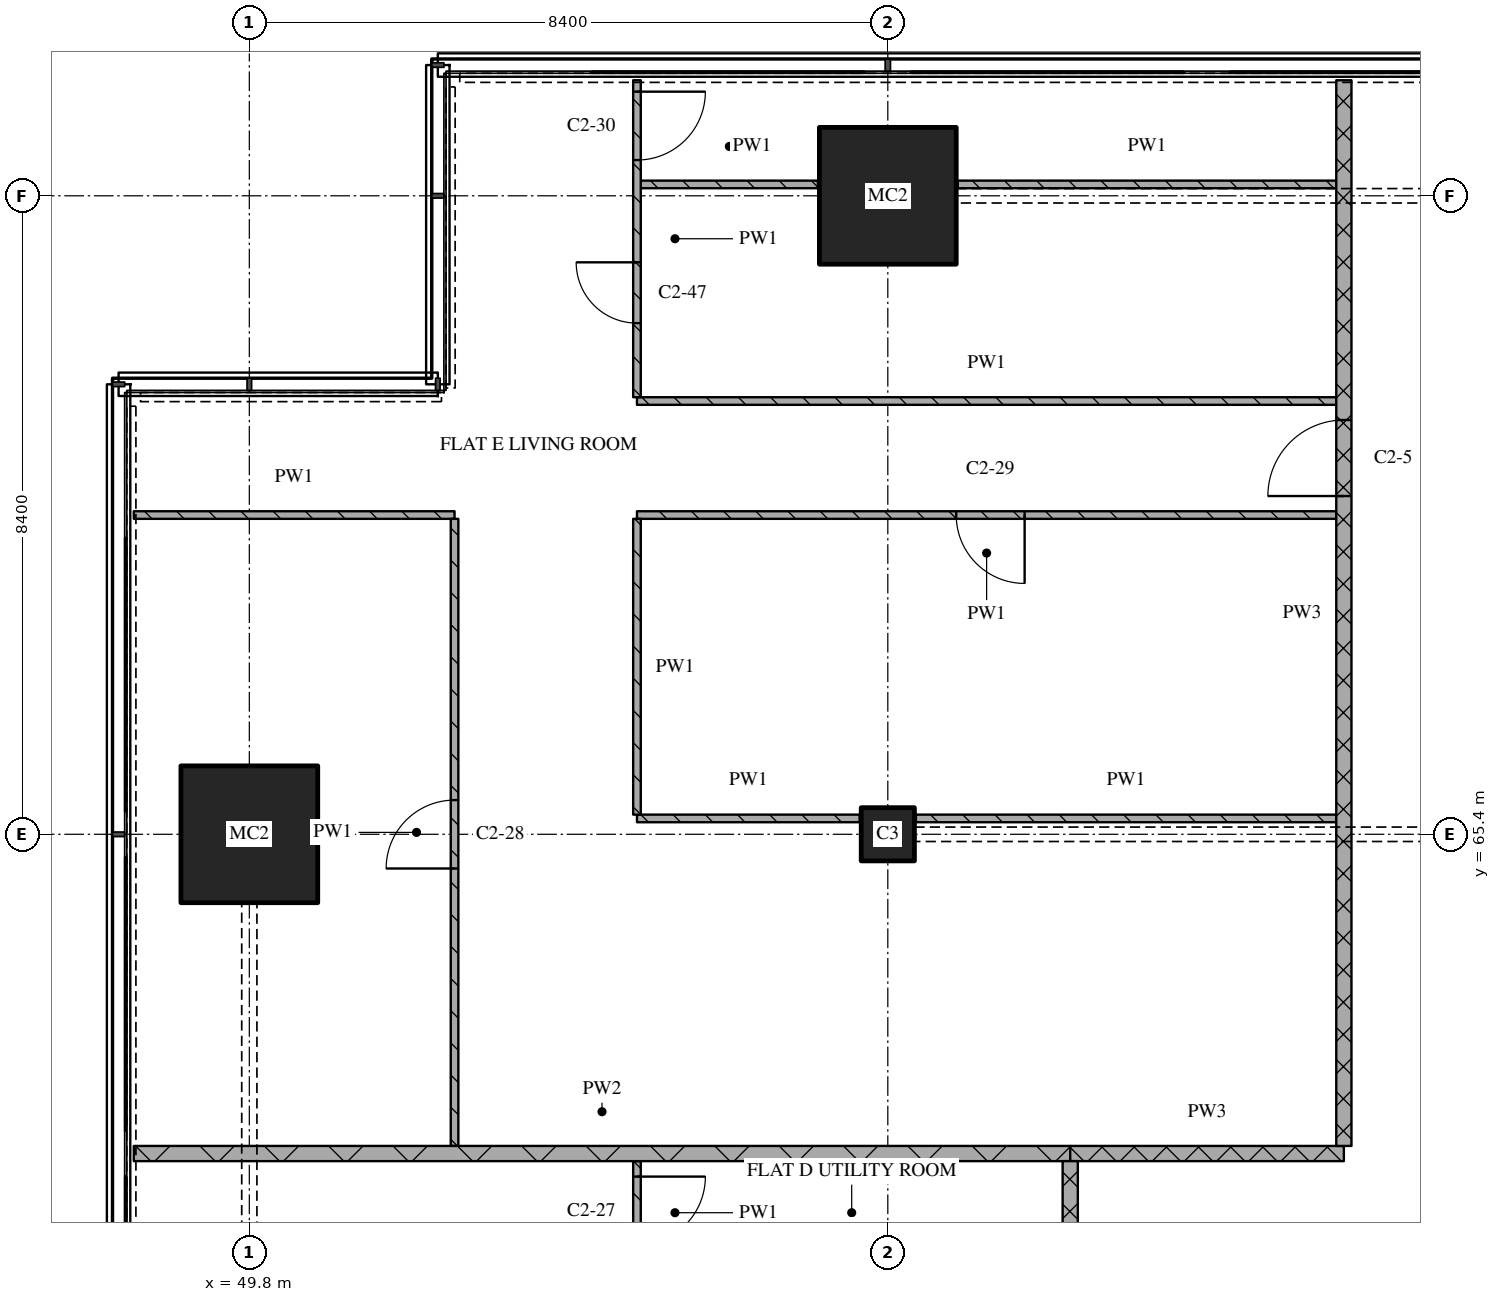
"""IFC4 building model, lengths in metres.
Left out: names, types, materials, properties, quantities, classifications, styles, units other than length and angle.
Written with IfcOpenShell. Run it as: python <this file> out.ifc"""

import sys

from ifc_helpers import new_model, si_unit, direction, frame, frame_2d, origin, origin_2d, place, context, subcontext, project, spatial, rectangle, extrude, element, fill, save


model = new_model("IFC4")
c1 = context("Model", 3, precision=1e-05, world=origin(), true_north=direction((0.0, 1.0)))
c2 = subcontext(c1, "Body", "Model", "MODEL_VIEW")
j1 = project(units=[si_unit("LENGTHUNIT", "METRE"), si_unit("PLANEANGLEUNIT", "RADIAN")], contexts=[c1])
p1 = place(None, origin())
s1 = spatial("IfcSite", under=j1, at=p1, CompositionType="ELEMENT")
p2 = place(p1, origin())
s2 = spatial("IfcBuilding", under=s1, at=p2, CompositionType="ELEMENT")
p3 = place(p2, frame((0.0, 0.0, 161.85)))
s3 = spatial("IfcBuildingStorey", under=s2, at=p3, CompositionType="ELEMENT", Elevation=161.85)
p4 = place(p3, frame((49.8, 65.4, 0.0), z_axis=(0.0, 0.0, 1.0), x_axis=(1.0, 0.0, 0.0)))
e1 = element("IfcColumn", 1, at=p4, inside=s3, PredefinedType="COLUMN", context=c2, shape_type="SweptSolid", body=[
    extrude(rectangle(XDim=1.8, YDim=1.8, at=origin_2d()), origin(), (0.0, 0.0, 1.0), 3.6),
])
p5 = place(p3, frame((58.2, 65.4, 0.0), z_axis=(0.0, 0.0, 1.0), x_axis=(1.0, 0.0, 0.0)))
e2 = element("IfcColumn", 2, at=p5, inside=s3, PredefinedType="COLUMN", context=c2, shape_type="SweptSolid", body=[
    extrude(rectangle(XDim=0.7, YDim=0.7, at=origin_2d()), origin(), (0.0, 0.0, 1.0), 3.6),
])
p6 = place(p3, frame((58.2, 73.8, 0.0), z_axis=(0.0, 0.0, 1.0), x_axis=(1.0, 0.0, 0.0)))
e3 = element("IfcColumn", 3, at=p6, inside=s3, PredefinedType="COLUMN", context=c2, shape_type="SweptSolid", body=[
    extrude(rectangle(XDim=1.8, YDim=1.8, at=origin_2d()), origin(), (0.0, 0.0, 1.0), 3.6),
])
p7 = place(p3, frame((60.6, 61.2, 0.0), z_axis=(0.0, 0.0, 1.0), x_axis=(1.0, 0.0, 0.0)))
e4 = element("IfcWall", 4, at=p7, inside=s3, PredefinedType="PARTITIONING", context=c2, shape_type="SweptSolid", body=[
    extrude(rectangle(XDim=3.6, YDim=0.2, at=frame_2d((1.8, 0.0))), origin(), (0.0, 0.0, 1.0), 3.32),
])
p8 = place(p3, frame((48.28, 61.2, 0.0), z_axis=(0.0, 0.0, 1.0), x_axis=(1.0, 0.0, 0.0)))
e5 = element("IfcWall", 5, at=p8, inside=s3, PredefinedType="PARTITIONING", context=c2, shape_type="SweptSolid", body=[
    extrude(rectangle(XDim=12.32, YDim=0.2, at=frame_2d((6.16, 0.0))), origin(), (0.0, 0.0, 1.0), 3.32),
])
p9 = place(p3, frame((54.9, 65.609, 0.0), z_axis=(0.0, 0.0, 1.0), x_axis=(1.0, 0.0, 0.0)))
e6 = element("IfcWall", 6, at=p9, inside=s3, PredefinedType="PARTITIONING", context=c2, shape_type="SweptSolid", body=[
    extrude(rectangle(XDim=2.93, YDim=0.1, at=frame_2d((1.465, 0.0))), origin(), (0.0, 0.0, 1.0), 3.32),
])
p10 = place(p3, frame((58.57, 65.609, 0.0), z_axis=(0.0, 0.0, 1.0), x_axis=(1.0, 0.0, 0.0)))
e7 = element("IfcWall", 7, at=p10, inside=s3, PredefinedType="PARTITIONING", context=c2, shape_type="SweptSolid", body=[
    extrude(rectangle(XDim=5.53, YDim=0.1, at=frame_2d((2.765, 0.0))), origin(), (0.0, 0.0, 1.0), 3.32),
])
p11 = place(p3, frame((48.28, 69.6, 0.0), z_axis=(0.0, 0.0, 1.0), x_axis=(1.0, 0.0, 0.0)))
e8 = element("IfcWall", 8, at=p11, inside=s3, PredefinedType="PARTITIONING", context=c2, shape_type="SweptSolid", body=[
    extrude(rectangle(XDim=4.22, YDim=0.1, at=frame_2d((2.11, 0.0))), origin(), (0.0, 0.0, 1.0), 3.32),
])
p12 = place(p3, frame((64.1, 69.6, 0.0), z_axis=(0.0, 0.0, 1.0), x_axis=(-1.0, 0.0, 0.0)))
e9 = element("IfcWall", 9, at=p12, inside=s3, PredefinedType="PARTITIONING", context=c2, shape_type="SweptSolid", body=[
    extrude(rectangle(XDim=9.2, YDim=0.1, at=frame_2d((4.6, 0.0))), origin(), (0.0, 0.0, 1.0), 3.32),
])
p13 = place(p12, frame((4.1, 0.0, 0.0)))
e10 = element("IfcOpeningElement", 10, at=p13, cuts=e9, PredefinedType="OPENING", context=c2, shape_type="SweptSolid", body=[
    extrude(rectangle(XDim=0.9, YDim=2.1, at=frame_2d((0.45, 1.05))), frame((0.0, 0.06, 0.0), z_axis=(0.0, -1.0, 0.0), x_axis=(1.0, 0.0, 0.0)), (0.0, 0.0, 1.0), 0.12),
])
p14 = place(p3, frame((54.9, 71.1, 0.0), z_axis=(0.0, 0.0, 1.0), x_axis=(1.0, 0.0, 0.0)))
e11 = element("IfcWall", 11, at=p14, inside=s3, PredefinedType="PARTITIONING", context=c2, shape_type="SweptSolid", body=[
    extrude(rectangle(XDim=9.2, YDim=0.1, at=frame_2d((4.6, 0.0))), origin(), (0.0, 0.0, 1.0), 3.32),
])
p15 = place(p3, frame((54.95, 73.949, 0.0), z_axis=(0.0, 0.0, 1.0), x_axis=(1.0, 0.0, 0.0)))
e12 = element("IfcWall", 12, at=p15, inside=s3, PredefinedType="PARTITIONING", context=c2, shape_type="SweptSolid", body=[
    extrude(rectangle(XDim=2.33, YDim=0.1, at=frame_2d((1.165, 0.0))), origin(), (0.0, 0.0, 1.0), 3.32),
])
p16 = place(p3, frame((59.12, 73.949, 0.0), z_axis=(0.0, 0.0, 1.0), x_axis=(1.0, 0.0, 0.0)))
e13 = element("IfcWall", 13, at=p16, inside=s3, PredefinedType="PARTITIONING", context=c2, shape_type="SweptSolid", body=[
    extrude(rectangle(XDim=4.98, YDim=0.1, at=frame_2d((2.49, 0.0))), origin(), (0.0, 0.0, 1.0), 3.32),
])
p17 = place(p3, frame((52.5, 61.3, 0.0), z_axis=(0.0, 0.0, 1.0), x_axis=(0.0, 1.0, 0.0)))
e14 = element("IfcWall", 14, at=p17, inside=s3, PredefinedType="PARTITIONING", context=c2, shape_type="SweptSolid", body=[
    extrude(rectangle(XDim=8.25, YDim=0.1, at=frame_2d((4.125, 0.0))), origin(), (0.0, 0.0, 1.0), 3.32),
])
p18 = place(p17, frame((3.65, 0.0, 0.0)))
e15 = element("IfcOpeningElement", 15, at=p18, cuts=e14, PredefinedType="OPENING", context=c2, shape_type="SweptSolid", body=[
    extrude(rectangle(XDim=0.9, YDim=2.1, at=frame_2d((0.45, 1.05))), frame((0.0, 0.06, 0.0), z_axis=(0.0, -1.0, 0.0), x_axis=(1.0, 0.0, 0.0)), (0.0, 0.0, 1.0), 0.12),
])
p19 = place(p3, frame((54.9, 61.1, 0.0), z_axis=(0.0, 0.0, 1.0), x_axis=(0.0, -1.0, 0.0)))
e16 = element("IfcWall", 16, at=p19, inside=s3, PredefinedType="PARTITIONING", context=c2, shape_type="SweptSolid", body=[
    extrude(rectangle(XDim=1.357, YDim=0.1, at=frame_2d((0.679, 0.0))), origin(), (0.0, 0.0, 1.0), 3.32),
])
p20 = place(p19, frame((0.204, 0.0, 0.0)))
e17 = element("IfcOpeningElement", 17, at=p20, cuts=e16, PredefinedType="OPENING", context=c2, shape_type="SweptSolid", body=[
    extrude(rectangle(XDim=0.9, YDim=2.1, at=frame_2d((0.45, 1.05))), frame((0.0, 0.06, 0.0), z_axis=(0.0, -1.0, 0.0), x_axis=(1.0, 0.0, 0.0)), (0.0, 0.0, 1.0), 0.12),
])
p21 = place(p3, frame((54.9, 69.55, 0.0), z_axis=(0.0, 0.0, 1.0), x_axis=(0.0, -1.0, 0.0)))
e18 = element("IfcWall", 18, at=p21, inside=s3, PredefinedType="PARTITIONING", context=c2, shape_type="SweptSolid", body=[
    extrude(rectangle(XDim=3.891, YDim=0.1, at=frame_2d((1.946, 0.0))), origin(), (0.0, 0.0, 1.0), 3.32),
])
p22 = place(p3, frame((54.9, 75.32, 0.0), z_axis=(0.0, 0.0, 1.0), x_axis=(0.0, -1.0, 0.0)))
e19 = element("IfcWall", 19, at=p22, inside=s3, PredefinedType="PARTITIONING", context=c2, shape_type="SweptSolid", body=[
    extrude(rectangle(XDim=4.17, YDim=0.1, at=frame_2d((2.085, 0.0))), origin(), (0.0, 0.0, 1.0), 3.32),
])
p23 = place(p22, frame((0.15, 0.0, 0.0)))
e20 = element("IfcOpeningElement", 20, at=p23, cuts=e19, PredefinedType="OPENING", context=c2, shape_type="SweptSolid", body=[
    extrude(rectangle(XDim=0.9, YDim=2.1, at=frame_2d((0.45, 1.05))), frame((0.0, 0.06, 0.0), z_axis=(0.0, -1.0, 0.0), x_axis=(1.0, 0.0, 0.0)), (0.0, 0.0, 1.0), 0.12),
])
p24 = place(p22, frame((2.395, 0.0, 0.0)))
e21 = element("IfcOpeningElement", 21, at=p24, cuts=e19, PredefinedType="OPENING", context=c2, shape_type="SweptSolid", body=[
    extrude(rectangle(XDim=0.8, YDim=2.1, at=frame_2d((0.4, 1.05))), frame((0.0, 0.06, 0.0), z_axis=(0.0, -1.0, 0.0), x_axis=(1.0, 0.0, 0.0)), (0.0, 0.0, 1.0), 0.12),
])
p25 = place(p3, frame((60.6, 43.3, 0.0), z_axis=(0.0, 0.0, 1.0), x_axis=(0.0, 1.0, 0.0)))
e22 = element("IfcWall", 22, at=p25, inside=s3, PredefinedType="PARTITIONING", context=c2, shape_type="SweptSolid", body=[
    extrude(rectangle(XDim=17.8, YDim=0.2, at=frame_2d((8.9, 0.0))), origin(), (0.0, 0.0, 1.0), 3.32),
])
p26 = place(p25, frame((7.95, 0.0, 0.0)))
e23 = element("IfcOpeningElement", 23, at=p26, cuts=e22, PredefinedType="OPENING", context=c2, shape_type="SweptSolid", body=[
    extrude(rectangle(XDim=1.0, YDim=2.1, at=frame_2d((0.5, 1.05))), frame((0.0, 0.11, 0.0), z_axis=(0.0, -1.0, 0.0), x_axis=(1.0, 0.0, 0.0)), (0.0, 0.0, 1.0), 0.22),
])
p27 = place(p3, frame((64.2, 61.3, 0.0), z_axis=(0.0, 0.0, 1.0), x_axis=(0.0, 1.0, 0.0)))
e24 = element("IfcWall", 24, at=p27, inside=s3, PredefinedType="PARTITIONING", context=c2, shape_type="SweptSolid", body=[
    extrude(rectangle(XDim=14.02, YDim=0.2, at=frame_2d((7.01, 0.0))), origin(), (0.0, 0.0, 1.0), 3.32),
])
p28 = place(p27, frame((8.55, 0.0, 0.0)))
e25 = element("IfcOpeningElement", 25, at=p28, cuts=e24, PredefinedType="OPENING", context=c2, shape_type="SweptSolid", body=[
    extrude(rectangle(XDim=1.0, YDim=2.1, at=frame_2d((0.5, 1.05))), frame((0.0, 0.11, 0.0), z_axis=(0.0, -1.0, 0.0), x_axis=(1.0, 0.0, 0.0)), (0.0, 0.0, 1.0), 0.22),
])
p29 = place(p13, origin())
e26 = element("IfcDoor", 26, at=p29, inside=s3, OperationType="SINGLE_SWING_LEFT", PredefinedType="DOOR", context=c2, shape_type="SweptSolid", body=[
    extrude(rectangle(XDim=0.9, YDim=2.1, at=frame_2d((0.45, 1.05))), frame((0.0, 0.025, 0.0), z_axis=(0.0, -1.0, 0.0), x_axis=(1.0, 0.0, 0.0)), (0.0, 0.0, 1.0), 0.05),
])
fill(e10, e26)
p30 = place(p18, origin())
e27 = element("IfcDoor", 27, at=p30, inside=s3, OperationType="SINGLE_SWING_LEFT", PredefinedType="DOOR", context=c2, shape_type="SweptSolid", body=[
    extrude(rectangle(XDim=0.9, YDim=2.1, at=frame_2d((0.45, 1.05))), frame((0.0, 0.025, 0.0), z_axis=(0.0, -1.0, 0.0), x_axis=(1.0, 0.0, 0.0)), (0.0, 0.0, 1.0), 0.05),
])
fill(e15, e27)
p31 = place(p20, origin())
e28 = element("IfcDoor", 28, at=p31, inside=s3, OperationType="SINGLE_SWING_LEFT", PredefinedType="DOOR", context=c2, shape_type="SweptSolid", body=[
    extrude(rectangle(XDim=0.9, YDim=2.1, at=frame_2d((0.45, 1.05))), frame((0.0, 0.025, 0.0), z_axis=(0.0, -1.0, 0.0), x_axis=(1.0, 0.0, 0.0)), (0.0, 0.0, 1.0), 0.05),
])
fill(e17, e28)
p32 = place(p23, origin())
e29 = element("IfcDoor", 29, at=p32, inside=s3, OperationType="SINGLE_SWING_LEFT", PredefinedType="DOOR", context=c2, shape_type="SweptSolid", body=[
    extrude(rectangle(XDim=0.9, YDim=2.1, at=frame_2d((0.45, 1.05))), frame((0.0, 0.025, 0.0), z_axis=(0.0, -1.0, 0.0), x_axis=(1.0, 0.0, 0.0)), (0.0, 0.0, 1.0), 0.05),
])
fill(e20, e29)
p33 = place(p24, origin())
e30 = element("IfcDoor", 30, at=p33, inside=s3, OperationType="SINGLE_SWING_RIGHT", PredefinedType="DOOR", context=c2, shape_type="SweptSolid", body=[
    extrude(rectangle(XDim=0.8, YDim=2.1, at=frame_2d((0.4, 1.05))), frame((0.0, 0.025, 0.0), z_axis=(0.0, -1.0, 0.0), x_axis=(1.0, 0.0, 0.0)), (0.0, 0.0, 1.0), 0.05),
])
fill(e21, e30)
p34 = place(p28, origin())
e31 = element("IfcDoor", 31, at=p34, inside=s3, OperationType="SINGLE_SWING_LEFT", PredefinedType="DOOR", context=c2, shape_type="SweptSolid", body=[
    extrude(rectangle(XDim=1.0, YDim=2.1, at=frame_2d((0.5, 1.05))), frame((0.0, 0.025, 0.0), z_axis=(0.0, -1.0, 0.0), x_axis=(1.0, 0.0, 0.0)), (0.0, 0.0, 1.0), 0.05),
])
fill(e25, e31)
save(model, sys.argv[1])
